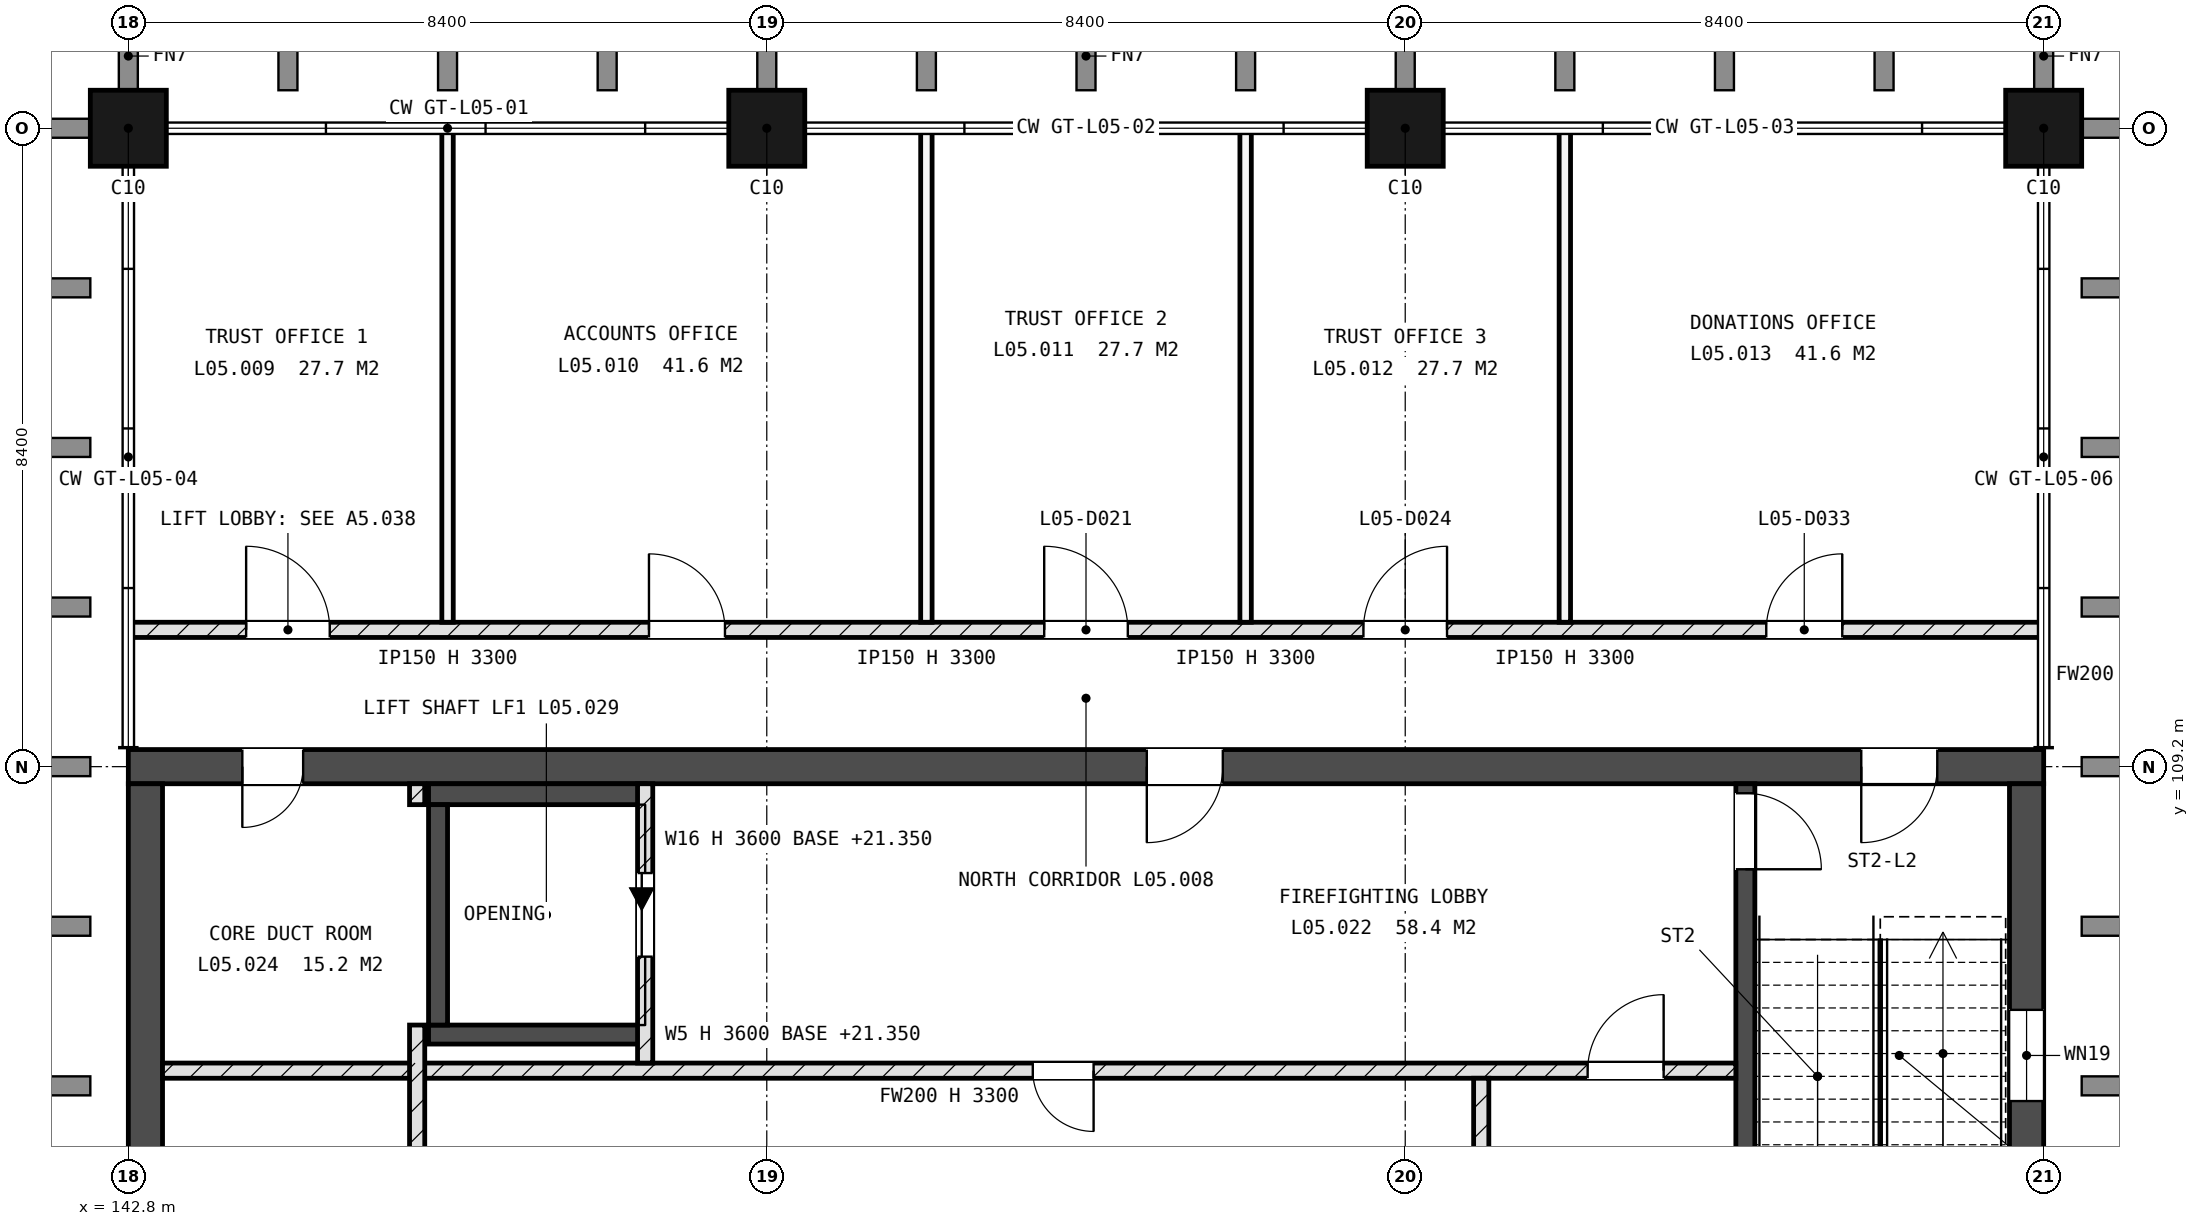
"""IFC4 building model, lengths in metres.
Left out: names, types, materials, properties, quantities, classifications, styles, units other than length and angle.
Written with IfcOpenShell. Run it as: python <this file> out.ifc"""

import sys

from ifc_helpers import new_model, si_unit, direction, frame, frame_2d, origin, origin_2d, place, context, subcontext, project, spatial, rectangle, extrude, element, fill, save


model = new_model("IFC4")
c1 = context("Model", 3, precision=1e-05, world=origin(), true_north=direction((0.0, 1.0)))
c2 = subcontext(c1, "Body", "Model", "MODEL_VIEW")
j1 = project(units=[si_unit("LENGTHUNIT", "METRE"), si_unit("PLANEANGLEUNIT", "RADIAN")], contexts=[c1])
p1 = place(None, origin())
s1 = spatial("IfcSite", under=j1, at=p1, CompositionType="ELEMENT")
p2 = place(p1, origin())
s2 = spatial("IfcBuilding", under=s1, at=p2, CompositionType="ELEMENT")
p3 = place(p2, frame((0.0, 0.0, 21.6)))
s3 = spatial("IfcBuildingStorey", under=s2, at=p3, CompositionType="ELEMENT", Elevation=21.6)
for number, where, z_axis, x_axis in (
    (1, (142.8, 117.6, -0.25), (0.0, 0.0, 1.0), (1.0, 0.0, 0.0)),
    (2, (151.2, 117.6, -0.25), (0.0, 0.0, 1.0), (1.0, 0.0, 0.0)),
    (3, (159.6, 117.6, -0.25), (0.0, 0.0, 1.0), (1.0, 0.0, 0.0)),
    (4, (168.0, 117.6, -0.25), (0.0, 0.0, 1.0), (1.0, 0.0, 0.0)),
):
    element("IfcColumn", number, at=place(p3, frame(where, z_axis=z_axis, x_axis=x_axis)), inside=s3, PredefinedType="COLUMN", context=c2, shape_type="SweptSolid", body=[
        extrude(rectangle(XDim=1.0, YDim=1.0, at=origin_2d()), origin(), (0.0, 0.0, 1.0), 3.6),
    ])
p4 = place(p3, frame((142.8, 109.2, -0.25), z_axis=(0.0, 0.0, 1.0), x_axis=(1.0, 0.0, 0.0)))
e5 = element("IfcWall", 5, at=p4, inside=s3, PredefinedType="SHEAR", context=c2, shape_type="SweptSolid", body=[
    extrude(rectangle(XDim=25.2, YDim=0.45, at=frame_2d((12.6, 0.0))), origin(), (0.0, 0.0, 1.0), 3.6),
])
p5 = place(p4, frame((22.8, 0.0, 0.25)))
e6 = element("IfcOpeningElement", 6, at=p5, cuts=e5, PredefinedType="OPENING", context=c2, shape_type="SweptSolid", body=[
    extrude(rectangle(XDim=1.0, YDim=2.1, at=frame_2d((0.5, 1.05))), frame((0.0, 0.235, 0.0), z_axis=(0.0, -1.0, 0.0), x_axis=(1.0, 0.0, 0.0)), (0.0, 0.0, 1.0), 0.47),
])
p6 = place(p4, frame((1.5, 0.0, 0.25)))
e7 = element("IfcOpeningElement", 7, at=p6, cuts=e5, PredefinedType="OPENING", context=c2, shape_type="SweptSolid", body=[
    extrude(rectangle(XDim=0.8, YDim=2.1, at=frame_2d((0.4, 1.05))), frame((0.0, 0.235, 0.0), z_axis=(0.0, -1.0, 0.0), x_axis=(1.0, 0.0, 0.0)), (0.0, 0.0, 1.0), 0.47),
])
p7 = place(p4, frame((13.4, 0.0, 0.25)))
e8 = element("IfcOpeningElement", 8, at=p7, cuts=e5, PredefinedType="OPENING", context=c2, shape_type="SweptSolid", body=[
    extrude(rectangle(XDim=1.0, YDim=2.1, at=frame_2d((0.5, 1.05))), frame((0.0, 0.235, 0.0), z_axis=(0.0, -1.0, 0.0), x_axis=(1.0, 0.0, 0.0)), (0.0, 0.0, 1.0), 0.47),
])
p8 = place(p3, frame((143.025, 92.625, -0.25), z_axis=(0.0, 0.0, 1.0), x_axis=(0.0, 1.0, 0.0)))
e9 = element("IfcWall", 9, at=p8, inside=s3, PredefinedType="SHEAR", context=c2, shape_type="SweptSolid", body=[
    extrude(rectangle(XDim=16.35, YDim=0.45, at=frame_2d((8.175, 0.0))), origin(), (0.0, 0.0, 1.0), 3.6),
])
p9 = place(p8, frame((2.975, 0.0, 1.85)))
e10 = element("IfcOpeningElement", 10, at=p9, cuts=e9, PredefinedType="OPENING", context=c2, shape_type="SweptSolid", body=[
    extrude(rectangle(XDim=1.2, YDim=0.9, at=frame_2d((0.6, 0.45))), frame((0.0, 0.235, 0.0), z_axis=(0.0, -1.0, 0.0), x_axis=(1.0, 0.0, 0.0)), (0.0, 0.0, 1.0), 0.47),
])
p10 = place(p3, frame((167.775, 92.625, -0.25), z_axis=(0.0, 0.0, 1.0), x_axis=(0.0, 1.0, 0.0)))
e11 = element("IfcWall", 11, at=p10, inside=s3, PredefinedType="SHEAR", context=c2, shape_type="SweptSolid", body=[
    extrude(rectangle(XDim=16.35, YDim=0.45, at=frame_2d((8.175, 0.0))), origin(), (0.0, 0.0, 1.0), 3.6),
])
p11 = place(p10, frame((12.175, 0.0, 1.85)))
e12 = element("IfcOpeningElement", 12, at=p11, cuts=e11, PredefinedType="OPENING", context=c2, shape_type="SweptSolid", body=[
    extrude(rectangle(XDim=1.2, YDim=0.9, at=frame_2d((0.6, 0.45))), frame((0.0, 0.235, 0.0), z_axis=(0.0, -1.0, 0.0), x_axis=(1.0, 0.0, 0.0)), (0.0, 0.0, 1.0), 0.47),
])
p12 = place(p3, frame((164.075, 101.35, -0.25), z_axis=(0.0, 0.0, 1.0), x_axis=(0.0, 1.0, 0.0)))
e13 = element("IfcWall", 13, at=p12, inside=s3, PredefinedType="SHEAR", context=c2, shape_type="SweptSolid", body=[
    extrude(rectangle(XDim=7.625, YDim=0.25, at=frame_2d((3.812, 0.0))), origin(), (0.0, 0.0, 1.0), 3.6),
])
p13 = place(p12, frame((6.5, 0.0, 0.25)))
e14 = element("IfcOpeningElement", 14, at=p13, cuts=e13, PredefinedType="OPENING", context=c2, shape_type="SweptSolid", body=[
    extrude(rectangle(XDim=1.0, YDim=2.1, at=frame_2d((0.5, 1.05))), frame((0.0, 0.135, 0.0), z_axis=(0.0, -1.0, 0.0), x_axis=(1.0, 0.0, 0.0)), (0.0, 0.0, 1.0), 0.27),
])
p14 = place(p3, frame((146.75, 105.675, -0.25), z_axis=(0.0, 0.0, 1.0), x_axis=(1.0, 0.0, 0.0)))
e15 = element("IfcWall", 15, at=p14, inside=s3, PredefinedType="SHEAR", context=c2, shape_type="SweptSolid", body=[
    extrude(rectangle(XDim=2.85, YDim=0.25, at=frame_2d((1.425, 0.0))), origin(), (0.0, 0.0, 1.0), 3.6),
])
p15 = place(p3, frame((146.75, 108.837, -0.25), z_axis=(0.0, 0.0, 1.0), x_axis=(1.0, 0.0, 0.0)))
e16 = element("IfcWall", 16, at=p15, inside=s3, PredefinedType="SHEAR", context=c2, shape_type="SweptSolid", body=[
    extrude(rectangle(XDim=2.85, YDim=0.275, at=frame_2d((1.425, 0.0))), origin(), (0.0, 0.0, 1.0), 3.6),
])
p16 = place(p3, frame((146.875, 105.8, -0.25), z_axis=(0.0, 0.0, 1.0), x_axis=(0.0, 1.0, 0.0)))
e17 = element("IfcWall", 17, at=p16, inside=s3, PredefinedType="SHEAR", context=c2, shape_type="SweptSolid", body=[
    extrude(rectangle(XDim=2.9, YDim=0.25, at=frame_2d((1.45, 0.0))), origin(), (0.0, 0.0, 1.0), 3.6),
])
p17 = place(p3, frame((143.25, 105.2, 0.0), z_axis=(0.0, 0.0, 1.0), x_axis=(1.0, 0.0, 0.0)))
e18 = element("IfcWall", 18, at=p17, inside=s3, PredefinedType="SOLIDWALL", context=c2, shape_type="SweptSolid", body=[
    extrude(rectangle(XDim=20.7, YDim=0.2, at=frame_2d((10.35, 0.0))), origin(), (0.0, 0.0, 1.0), 3.3),
])
p18 = place(p17, frame((11.45, 0.0, 0.0)))
e19 = element("IfcOpeningElement", 19, at=p18, cuts=e18, PredefinedType="OPENING", context=c2, shape_type="SweptSolid", body=[
    extrude(rectangle(XDim=0.8, YDim=2.1, at=frame_2d((0.4, 1.05))), frame((0.0, 0.11, 0.0), z_axis=(0.0, -1.0, 0.0), x_axis=(1.0, 0.0, 0.0)), (0.0, 0.0, 1.0), 0.22),
])
p19 = place(p17, frame((18.75, 0.0, 0.0)))
e20 = element("IfcOpeningElement", 20, at=p19, cuts=e18, PredefinedType="OPENING", context=c2, shape_type="SweptSolid", body=[
    extrude(rectangle(XDim=1.0, YDim=2.1, at=frame_2d((0.5, 1.05))), frame((0.0, 0.11, 0.0), z_axis=(0.0, -1.0, 0.0), x_axis=(1.0, 0.0, 0.0)), (0.0, 0.0, 1.0), 0.22),
])
p20 = place(p3, frame((142.8, 111.0, 0.0), z_axis=(0.0, 0.0, 1.0), x_axis=(1.0, 0.0, 0.0)))
e21 = element("IfcWall", 21, at=p20, inside=s3, PredefinedType="SOLIDWALL", context=c2, shape_type="SweptSolid", body=[
    extrude(rectangle(XDim=25.2, YDim=0.2, at=frame_2d((12.6, 0.0))), origin(), (0.0, 0.0, 1.0), 3.3),
])
p21 = place(p20, frame((1.55, 0.0, 0.0)))
e22 = element("IfcOpeningElement", 22, at=p21, cuts=e21, PredefinedType="OPENING", context=c2, shape_type="SweptSolid", body=[
    extrude(rectangle(XDim=1.1, YDim=2.25, at=frame_2d((0.55, 1.125))), frame((0.0, 0.11, 0.0), z_axis=(0.0, -1.0, 0.0), x_axis=(1.0, 0.0, 0.0)), (0.0, 0.0, 1.0), 0.22),
])
p22 = place(p20, frame((6.85, 0.0, 0.0)))
e23 = element("IfcOpeningElement", 23, at=p22, cuts=e21, PredefinedType="OPENING", context=c2, shape_type="SweptSolid", body=[
    extrude(rectangle(XDim=1.0, YDim=2.1, at=frame_2d((0.5, 1.05))), frame((0.0, 0.11, 0.0), z_axis=(0.0, -1.0, 0.0), x_axis=(1.0, 0.0, 0.0)), (0.0, 0.0, 1.0), 0.22),
])
p23 = place(p20, frame((12.05, 0.0, 0.0)))
e24 = element("IfcOpeningElement", 24, at=p23, cuts=e21, PredefinedType="OPENING", context=c2, shape_type="SweptSolid", body=[
    extrude(rectangle(XDim=1.1, YDim=2.25, at=frame_2d((0.55, 1.125))), frame((0.0, 0.11, 0.0), z_axis=(0.0, -1.0, 0.0), x_axis=(1.0, 0.0, 0.0)), (0.0, 0.0, 1.0), 0.22),
])
p24 = place(p20, frame((16.25, 0.0, 0.0)))
e25 = element("IfcOpeningElement", 25, at=p24, cuts=e21, PredefinedType="OPENING", context=c2, shape_type="SweptSolid", body=[
    extrude(rectangle(XDim=1.1, YDim=2.25, at=frame_2d((0.55, 1.125))), frame((0.0, 0.11, 0.0), z_axis=(0.0, -1.0, 0.0), x_axis=(1.0, 0.0, 0.0)), (0.0, 0.0, 1.0), 0.22),
])
p25 = place(p20, frame((21.55, 0.0, 0.0)))
e26 = element("IfcOpeningElement", 26, at=p25, cuts=e21, PredefinedType="OPENING", context=c2, shape_type="SweptSolid", body=[
    extrude(rectangle(XDim=1.0, YDim=2.1, at=frame_2d((0.5, 1.05))), frame((0.0, 0.11, 0.0), z_axis=(0.0, -1.0, 0.0), x_axis=(1.0, 0.0, 0.0)), (0.0, 0.0, 1.0), 0.22),
])
p26 = place(p3, frame((146.6, 100.5, 0.0), z_axis=(0.0, 0.0, 1.0), x_axis=(0.0, 1.0, 0.0)))
e27 = element("IfcWall", 27, at=p26, inside=s3, PredefinedType="SOLIDWALL", context=c2, shape_type="SweptSolid", body=[
    extrude(rectangle(XDim=5.3, YDim=0.2, at=frame_2d((2.65, 0.0))), origin(), (0.0, 0.0, 1.0), 3.3),
])
p27 = place(p26, frame((1.8, 0.0, 0.0)))
e28 = element("IfcOpeningElement", 28, at=p27, cuts=e27, PredefinedType="OPENING", context=c2, shape_type="SweptSolid", body=[
    extrude(rectangle(XDim=1.0, YDim=2.1, at=frame_2d((0.5, 1.05))), frame((0.0, 0.11, 0.0), z_axis=(0.0, -1.0, 0.0), x_axis=(1.0, 0.0, 0.0)), (0.0, 0.0, 1.0), 0.22),
])
p28 = place(p3, frame((146.6, 108.7, 0.0), z_axis=(0.0, 0.0, 1.0), x_axis=(0.0, 1.0, 0.0)))
e29 = element("IfcWall", 29, at=p28, inside=s3, PredefinedType="SOLIDWALL", context=c2, shape_type="SweptSolid", body=[
    extrude(rectangle(XDim=0.275, YDim=0.2, at=frame_2d((0.138, 0.0))), origin(), (0.0, 0.0, 1.0), 3.3),
])
p29 = place(p3, frame((147.0, 111.1, 0.0), z_axis=(0.0, 0.0, 1.0), x_axis=(0.0, 1.0, 0.0)))
e30 = element("IfcWall", 30, at=p29, inside=s3, PredefinedType="PARTITIONING", context=c2, shape_type="SweptSolid", body=[
    extrude(rectangle(XDim=6.5, YDim=0.15, at=frame_2d((3.25, 0.0))), origin(), (0.0, 0.0, 1.0), 3.3),
])
p30 = place(p3, frame((149.6, 105.3, 0.0), z_axis=(0.0, 0.0, 1.0), x_axis=(0.0, 1.0, 0.0)))
e31 = element("IfcWall", 31, at=p30, inside=s3, PredefinedType="SOLIDWALL", context=c2, shape_type="SweptSolid", body=[
    extrude(rectangle(XDim=3.675, YDim=0.2, at=frame_2d((1.837, 0.0))), origin(), (0.0, 0.0, 1.0), 3.3),
])
p31 = place(p30, frame((1.4, 0.0, 0.0)))
e32 = element("IfcOpeningElement", 32, at=p31, cuts=e31, PredefinedType="OPENING", context=c2, shape_type="SweptSolid", body=[
    extrude(rectangle(XDim=1.1, YDim=2.1, at=frame_2d((0.55, 1.05))), frame((0.0, 0.11, 0.0), z_axis=(0.0, -1.0, 0.0), x_axis=(1.0, 0.0, 0.0)), (0.0, 0.0, 1.0), 0.22),
])
for number, where, z_axis, x_axis in (
    (33, (153.3, 111.1, 0.0), (0.0, 0.0, 1.0), (0.0, 1.0, 0.0)),
    (34, (157.5, 111.1, 0.0), (0.0, 0.0, 1.0), (0.0, 1.0, 0.0)),
):
    element("IfcWall", number, at=place(p3, frame(where, z_axis=z_axis, x_axis=x_axis)), inside=s3, PredefinedType="PARTITIONING", context=c2, shape_type="SweptSolid", body=[
        extrude(rectangle(XDim=6.5, YDim=0.15, at=frame_2d((3.25, 0.0))), origin(), (0.0, 0.0, 1.0), 3.3),
    ])
p32 = place(p3, frame((160.6, 92.625, 0.0), z_axis=(0.0, 0.0, 1.0), x_axis=(0.0, 1.0, 0.0)))
e35 = element("IfcWall", 35, at=p32, inside=s3, PredefinedType="SOLIDWALL", context=c2, shape_type="SweptSolid", body=[
    extrude(rectangle(XDim=12.475, YDim=0.2, at=frame_2d((6.238, 0.0))), origin(), (0.0, 0.0, 1.0), 3.3),
])
p33 = place(p32, frame((5.075, 0.0, 0.0)))
e36 = element("IfcOpeningElement", 36, at=p33, cuts=e35, PredefinedType="OPENING", context=c2, shape_type="SweptSolid", body=[
    extrude(rectangle(XDim=0.8, YDim=2.1, at=frame_2d((0.4, 1.05))), frame((0.0, 0.11, 0.0), z_axis=(0.0, -1.0, 0.0), x_axis=(1.0, 0.0, 0.0)), (0.0, 0.0, 1.0), 0.22),
])
p34 = place(p32, frame((0.775, 0.0, 0.0)))
e37 = element("IfcOpeningElement", 37, at=p34, cuts=e35, PredefinedType="OPENING", context=c2, shape_type="SweptSolid", body=[
    extrude(rectangle(XDim=1.0, YDim=2.1, at=frame_2d((0.5, 1.05))), frame((0.0, 0.11, 0.0), z_axis=(0.0, -1.0, 0.0), x_axis=(1.0, 0.0, 0.0)), (0.0, 0.0, 1.0), 0.22),
])
p35 = place(p3, frame((161.7, 111.1, 0.0), z_axis=(0.0, 0.0, 1.0), x_axis=(0.0, 1.0, 0.0)))
e38 = element("IfcWall", 38, at=p35, inside=s3, PredefinedType="PARTITIONING", context=c2, shape_type="SweptSolid", body=[
    extrude(rectangle(XDim=6.5, YDim=0.15, at=frame_2d((3.25, 0.0))), origin(), (0.0, 0.0, 1.0), 3.3),
])
p36 = place(p11, origin())
e39 = element("IfcWindow", 39, at=p36, inside=s3, PartitioningType="SINGLE_PANEL", PredefinedType="WINDOW", context=c2, shape_type="SweptSolid", body=[
    extrude(rectangle(XDim=1.2, YDim=0.9, at=frame_2d((0.6, 0.45))), frame((0.0, 0.03, 0.0), z_axis=(0.0, -1.0, 0.0), x_axis=(1.0, 0.0, 0.0)), (0.0, 0.0, 1.0), 0.06),
])
fill(e12, e39)
p37 = place(p31, origin())
e40 = element("IfcDoor", 40, at=p37, inside=s3, OperationType="SLIDING_TO_LEFT", PredefinedType="DOOR", context=c2, shape_type="SweptSolid", body=[
    extrude(rectangle(XDim=1.1, YDim=2.1, at=frame_2d((0.55, 1.05))), frame((0.0, 0.025, 0.0), z_axis=(0.0, -1.0, 0.0), x_axis=(1.0, 0.0, 0.0)), (0.0, 0.0, 1.0), 0.05),
])
fill(e32, e40)
p38 = place(p13, origin())
e41 = element("IfcDoor", 41, at=p38, inside=s3, OperationType="SINGLE_SWING_LEFT", PredefinedType="DOOR", context=c2, shape_type="SweptSolid", body=[
    extrude(rectangle(XDim=1.0, YDim=2.1, at=frame_2d((0.5, 1.05))), frame((0.0, 0.025, 0.0), z_axis=(0.0, -1.0, 0.0), x_axis=(1.0, 0.0, 0.0)), (0.0, 0.0, 1.0), 0.05),
])
fill(e14, e41)
p39 = place(p5, origin())
e42 = element("IfcDoor", 42, at=p39, inside=s3, OperationType="SINGLE_SWING_LEFT", PredefinedType="DOOR", context=c2, shape_type="SweptSolid", body=[
    extrude(rectangle(XDim=1.0, YDim=2.1, at=frame_2d((0.5, 1.05))), frame((0.0, 0.025, 0.0), z_axis=(0.0, -1.0, 0.0), x_axis=(1.0, 0.0, 0.0)), (0.0, 0.0, 1.0), 0.05),
])
fill(e6, e42)
p40 = place(p21, origin())
e43 = element("IfcDoor", 43, at=p40, inside=s3, OperationType="SINGLE_SWING_RIGHT", PredefinedType="DOOR", context=c2, shape_type="SweptSolid", body=[
    extrude(rectangle(XDim=1.1, YDim=2.25, at=frame_2d((0.55, 1.125))), frame((0.0, 0.025, 0.0), z_axis=(0.0, -1.0, 0.0), x_axis=(1.0, 0.0, 0.0)), (0.0, 0.0, 1.0), 0.05),
])
fill(e22, e43)
p41 = place(p22, origin())
e44 = element("IfcDoor", 44, at=p41, inside=s3, OperationType="SINGLE_SWING_RIGHT", PredefinedType="DOOR", context=c2, shape_type="SweptSolid", body=[
    extrude(rectangle(XDim=1.0, YDim=2.1, at=frame_2d((0.5, 1.05))), frame((0.0, 0.025, 0.0), z_axis=(0.0, -1.0, 0.0), x_axis=(1.0, 0.0, 0.0)), (0.0, 0.0, 1.0), 0.05),
])
fill(e23, e44)
p42 = place(p23, origin())
e45 = element("IfcDoor", 45, at=p42, inside=s3, OperationType="SINGLE_SWING_RIGHT", PredefinedType="DOOR", context=c2, shape_type="SweptSolid", body=[
    extrude(rectangle(XDim=1.1, YDim=2.25, at=frame_2d((0.55, 1.125))), frame((0.0, 0.025, 0.0), z_axis=(0.0, -1.0, 0.0), x_axis=(1.0, 0.0, 0.0)), (0.0, 0.0, 1.0), 0.05),
])
fill(e24, e45)
p43 = place(p24, origin())
e46 = element("IfcDoor", 46, at=p43, inside=s3, OperationType="SINGLE_SWING_LEFT", PredefinedType="DOOR", context=c2, shape_type="SweptSolid", body=[
    extrude(rectangle(XDim=1.1, YDim=2.25, at=frame_2d((0.55, 1.125))), frame((0.0, 0.025, 0.0), z_axis=(0.0, -1.0, 0.0), x_axis=(1.0, 0.0, 0.0)), (0.0, 0.0, 1.0), 0.05),
])
fill(e25, e46)
p44 = place(p25, origin())
e47 = element("IfcDoor", 47, at=p44, inside=s3, OperationType="SINGLE_SWING_LEFT", PredefinedType="DOOR", context=c2, shape_type="SweptSolid", body=[
    extrude(rectangle(XDim=1.0, YDim=2.1, at=frame_2d((0.5, 1.05))), frame((0.0, 0.025, 0.0), z_axis=(0.0, -1.0, 0.0), x_axis=(1.0, 0.0, 0.0)), (0.0, 0.0, 1.0), 0.05),
])
fill(e26, e47)
p45 = place(p18, origin())
e48 = element("IfcDoor", 48, at=p45, inside=s3, OperationType="SINGLE_SWING_RIGHT", PredefinedType="DOOR", context=c2, shape_type="SweptSolid", body=[
    extrude(rectangle(XDim=0.8, YDim=2.1, at=frame_2d((0.4, 1.05))), frame((0.0, 0.025, 0.0), z_axis=(0.0, -1.0, 0.0), x_axis=(1.0, 0.0, 0.0)), (0.0, 0.0, 1.0), 0.05),
])
fill(e19, e48)
p46 = place(p6, origin())
e49 = element("IfcDoor", 49, at=p46, inside=s3, OperationType="SINGLE_SWING_LEFT", PredefinedType="DOOR", context=c2, shape_type="SweptSolid", body=[
    extrude(rectangle(XDim=0.8, YDim=2.1, at=frame_2d((0.4, 1.05))), frame((0.0, 0.025, 0.0), z_axis=(0.0, -1.0, 0.0), x_axis=(1.0, 0.0, 0.0)), (0.0, 0.0, 1.0), 0.05),
])
fill(e7, e49)
p47 = place(p7, origin())
e50 = element("IfcDoor", 50, at=p47, inside=s3, OperationType="SINGLE_SWING_LEFT", PredefinedType="DOOR", context=c2, shape_type="SweptSolid", body=[
    extrude(rectangle(XDim=1.0, YDim=2.1, at=frame_2d((0.5, 1.05))), frame((0.0, 0.025, 0.0), z_axis=(0.0, -1.0, 0.0), x_axis=(1.0, 0.0, 0.0)), (0.0, 0.0, 1.0), 0.05),
])
fill(e8, e50)
p48 = place(p19, origin())
e51 = element("IfcDoor", 51, at=p48, inside=s3, OperationType="SINGLE_SWING_LEFT", PredefinedType="DOOR", context=c2, shape_type="SweptSolid", body=[
    extrude(rectangle(XDim=1.0, YDim=2.1, at=frame_2d((0.5, 1.05))), frame((0.0, 0.025, 0.0), z_axis=(0.0, -1.0, 0.0), x_axis=(1.0, 0.0, 0.0)), (0.0, 0.0, 1.0), 0.05),
])
fill(e20, e51)
save(model, sys.argv[1])
